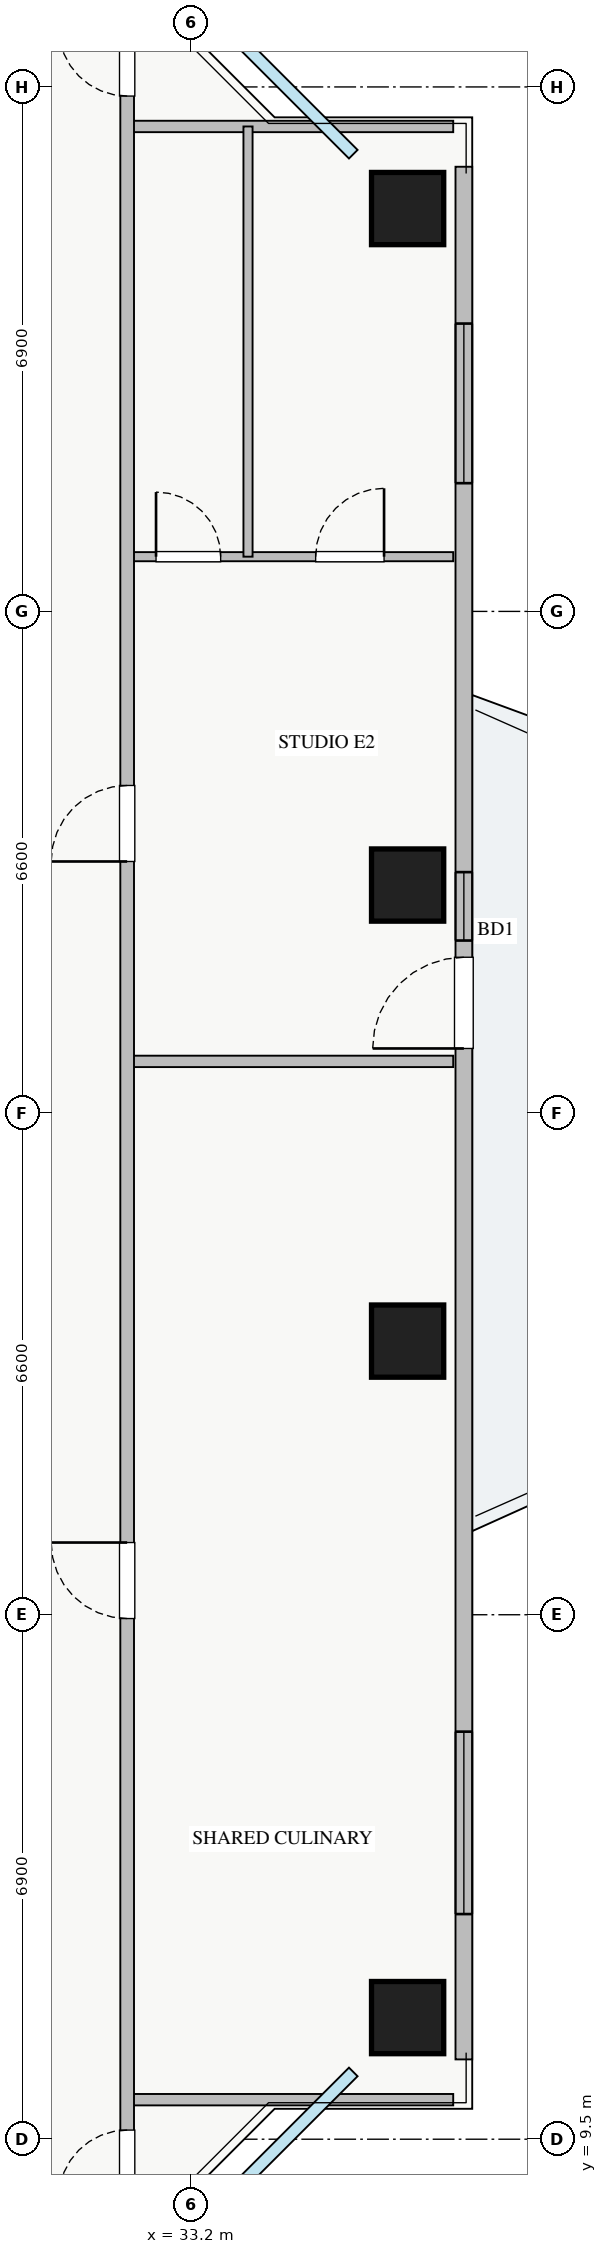
"""IFC4 building model, lengths in metres.
Left out: names, types, materials, properties, quantities, classifications, styles, units other than length and angle.
Written with IfcOpenShell. Run it as: python <this file> out.ifc"""

import sys

from ifc_helpers import new_model, si_unit, direction, frame, frame_2d, origin, origin_2d, place, context, subcontext, project, spatial, rectangle, extrude, source, transform, mapped, element, fill, save


model = new_model("IFC4")
c1 = context("Model", 3, precision=1e-05, world=origin(), true_north=direction((0.0, 1.0)))
c2 = subcontext(c1, "Body", "Model", "MODEL_VIEW")
j1 = project(units=[si_unit("LENGTHUNIT", "METRE"), si_unit("PLANEANGLEUNIT", "RADIAN")], contexts=[c1])
p1 = place(None, origin())
s1 = spatial("IfcSite", under=j1, at=p1, CompositionType="ELEMENT")
p2 = place(p1, origin())
s2 = spatial("IfcBuilding", under=s1, at=p2, CompositionType="ELEMENT")
p3 = place(p2, frame((0.0, 0.0, 150.25)))
s3 = spatial("IfcBuildingStorey", under=s2, at=p3, CompositionType="ELEMENT", Elevation=150.25)
m1 = source(origin(), c2, "Body", "SweptSolid", [
    extrude(rectangle(XDim=0.95, YDim=0.95, at=origin_2d()), origin(), (0.0, 0.0, 1.0), 3.25),
])
for number, where, z_axis, x_axis in (
    (1, (36.05, 11.1, 0.0), (0.0, 0.0, 1.0), (1.0, 0.0, 0.0)),
    (2, (36.05, 20.0, 0.0), (0.0, 0.0, 1.0), (1.0, 0.0, 0.0)),
    (3, (36.05, 26.0, 0.0), (0.0, 0.0, 1.0), (1.0, 0.0, 0.0)),
    (4, (36.05, 34.9, 0.0), (0.0, 0.0, 1.0), (1.0, 0.0, 0.0)),
):
    element("IfcColumn", number, at=place(p3, frame(where, z_axis=z_axis, x_axis=x_axis)), inside=s3, PredefinedType="COLUMN", context=c2, shape_type="MappedRepresentation", body=[
        mapped(m1, transform((0.0, 0.0, 0.0), x_axis=(1.0, 0.0, 0.0), y_axis=(0.0, 1.0, 0.0), z_axis=(0.0, 0.0, 1.0), scale=1.0)),
    ])
p4 = place(p3, frame((36.79, 10.55, 0.0), z_axis=(0.0, 0.0, 1.0), x_axis=(0.0, 1.0, 0.0)))
e5 = element("IfcWall", 5, at=p4, inside=s3, PredefinedType="STANDARD", context=c2, shape_type="SweptSolid", body=[
    extrude(rectangle(XDim=24.9, YDim=0.22, at=frame_2d((12.45, 0.0))), origin(), (0.0, 0.0, 1.0), 2.61),
])
p5 = place(p4, frame((13.3, 0.0, 0.0)))
e6 = element("IfcOpeningElement", 6, at=p5, cuts=e5, PredefinedType="OPENING", context=c2, shape_type="SweptSolid", body=[
    extrude(rectangle(XDim=1.2, YDim=2.1, at=frame_2d((0.6, 1.05))), frame((0.0, 0.12, 0.0), z_axis=(0.0, -1.0, 0.0), x_axis=(1.0, 0.0, 0.0)), (0.0, 0.0, 1.0), 0.24),
])
p6 = place(p4, frame((1.912, 0.0, 0.9)))
e7 = element("IfcOpeningElement", 7, at=p6, cuts=e5, PredefinedType="OPENING", context=c2, shape_type="SweptSolid", body=[
    extrude(rectangle(XDim=2.4, YDim=1.48, at=frame_2d((1.2, 0.74))), frame((0.0, 0.12, 0.0), z_axis=(0.0, -1.0, 0.0), x_axis=(1.0, 0.0, 0.0)), (0.0, 0.0, 1.0), 0.24),
])
p7 = place(p4, frame((20.737, 0.0, 0.9)))
e8 = element("IfcOpeningElement", 8, at=p7, cuts=e5, PredefinedType="OPENING", context=c2, shape_type="SweptSolid", body=[
    extrude(rectangle(XDim=2.1, YDim=1.48, at=frame_2d((1.05, 0.74))), frame((0.0, 0.12, 0.0), z_axis=(0.0, -1.0, 0.0), x_axis=(1.0, 0.0, 0.0)), (0.0, 0.0, 1.0), 0.24),
])
p8 = place(p4, frame((14.72, 0.0, 0.9)))
e9 = element("IfcOpeningElement", 9, at=p8, cuts=e5, PredefinedType="OPENING", context=c2, shape_type="SweptSolid", body=[
    extrude(rectangle(XDim=0.9, YDim=1.2, at=frame_2d((0.45, 0.6))), frame((0.0, 0.12, 0.0), z_axis=(0.0, -1.0, 0.0), x_axis=(1.0, 0.0, 0.0)), (0.0, 0.0, 1.0), 0.24),
])
for number, where, z_axis, x_axis in (
    (10, (32.36, 35.98, 0.0), (0.0, 0.0, 1.0), (1.0, 0.0, 0.0)),
    (11, (32.36, 10.02, 0.0), (0.0, 0.0, 1.0), (1.0, 0.0, 0.0)),
):
    element("IfcWall", number, at=place(p3, frame(where, z_axis=z_axis, x_axis=x_axis)), inside=s3, PredefinedType="PARTITIONING", context=c2, shape_type="SweptSolid", body=[
        extrude(rectangle(XDim=4.29, YDim=0.15, at=frame_2d((2.145, 0.0))), origin(), (0.0, 0.0, 1.0), 3.07),
    ])
p9 = place(p3, frame((32.36, 30.32, 0.0), z_axis=(0.0, 0.0, 1.0), x_axis=(1.0, 0.0, 0.0)))
e12 = element("IfcWall", 12, at=p9, inside=s3, PredefinedType="PLUMBINGWALL", context=c2, shape_type="SweptSolid", body=[
    extrude(rectangle(XDim=4.29, YDim=0.12, at=frame_2d((2.145, 0.0))), origin(), (0.0, 0.0, 1.0), 3.07),
])
p10 = place(p9, frame((0.38, 0.0, 0.0)))
e13 = element("IfcOpeningElement", 13, at=p10, cuts=e12, PredefinedType="OPENING", context=c2, shape_type="SweptSolid", body=[
    extrude(rectangle(XDim=0.85, YDim=2.05, at=frame_2d((0.425, 1.025))), frame((0.0, 0.07, 0.0), z_axis=(0.0, -1.0, 0.0), x_axis=(1.0, 0.0, 0.0)), (0.0, 0.0, 1.0), 0.14),
])
p11 = place(p9, frame((2.48, 0.0, 0.0)))
e14 = element("IfcOpeningElement", 14, at=p11, cuts=e12, PredefinedType="OPENING", context=c2, shape_type="SweptSolid", body=[
    extrude(rectangle(XDim=0.9, YDim=2.05, at=frame_2d((0.45, 1.025))), frame((0.0, 0.07, 0.0), z_axis=(0.0, -1.0, 0.0), x_axis=(1.0, 0.0, 0.0)), (0.0, 0.0, 1.0), 0.14),
])
p12 = place(p3, frame((33.95, 30.32, 0.0), z_axis=(0.0, 0.0, 1.0), x_axis=(0.0, 1.0, 0.0)))
e15 = element("IfcWall", 15, at=p12, inside=s3, PredefinedType="PLUMBINGWALL", context=c2, shape_type="SweptSolid", body=[
    extrude(rectangle(XDim=5.66, YDim=0.12, at=frame_2d((2.83, 0.0))), origin(), (0.0, 0.0, 1.0), 3.07),
])
p13 = place(p3, frame((32.36, 23.68, 0.0), z_axis=(0.0, 0.0, 1.0), x_axis=(1.0, 0.0, 0.0)))
e16 = element("IfcWall", 16, at=p13, inside=s3, PredefinedType="PARTITIONING", context=c2, shape_type="SweptSolid", body=[
    extrude(rectangle(XDim=4.29, YDim=0.15, at=frame_2d((2.145, 0.0))), origin(), (0.0, 0.0, 1.0), 3.07),
])
p14 = place(p3, frame((32.36, 8.3, 0.0), z_axis=(0.0, 0.0, 1.0), x_axis=(0.0, 1.0, 0.0)))
e17 = element("IfcWall", 17, at=p14, inside=s3, PredefinedType="PARTITIONING", context=c2, shape_type="SweptSolid", body=[
    extrude(rectangle(XDim=29.4, YDim=0.18, at=frame_2d((14.7, 0.0))), origin(), (0.0, 0.0, 1.0), 3.07),
])
p15 = place(p14, frame((28.08, 0.0, 0.0)))
e18 = element("IfcOpeningElement", 18, at=p15, cuts=e17, PredefinedType="OPENING", context=c2, shape_type="SweptSolid", body=[
    extrude(rectangle(XDim=0.9, YDim=2.05, at=frame_2d((0.45, 1.025))), frame((0.0, 0.1, 0.0), z_axis=(0.0, -1.0, 0.0), x_axis=(1.0, 0.0, 0.0)), (0.0, 0.0, 1.0), 0.2),
])
p16 = place(p14, frame((0.42, 0.0, 0.0)))
e19 = element("IfcOpeningElement", 19, at=p16, cuts=e17, PredefinedType="OPENING", context=c2, shape_type="SweptSolid", body=[
    extrude(rectangle(XDim=0.9, YDim=2.05, at=frame_2d((0.45, 1.025))), frame((0.0, 0.1, 0.0), z_axis=(0.0, -1.0, 0.0), x_axis=(1.0, 0.0, 0.0)), (0.0, 0.0, 1.0), 0.2),
])
p17 = place(p14, frame((8.05, 0.0, 0.0)))
e20 = element("IfcOpeningElement", 20, at=p17, cuts=e17, PredefinedType="OPENING", context=c2, shape_type="SweptSolid", body=[
    extrude(rectangle(XDim=1.0, YDim=2.05, at=frame_2d((0.5, 1.025))), frame((0.0, 0.1, 0.0), z_axis=(0.0, -1.0, 0.0), x_axis=(1.0, 0.0, 0.0)), (0.0, 0.0, 1.0), 0.2),
])
p18 = place(p14, frame((18.01, 0.0, 0.0)))
e21 = element("IfcOpeningElement", 21, at=p18, cuts=e17, PredefinedType="OPENING", context=c2, shape_type="SweptSolid", body=[
    extrude(rectangle(XDim=1.0, YDim=2.05, at=frame_2d((0.5, 1.025))), frame((0.0, 0.1, 0.0), z_axis=(0.0, -1.0, 0.0), x_axis=(1.0, 0.0, 0.0)), (0.0, 0.0, 1.0), 0.2),
])
m2 = source(origin(), c2, "Body", "SweptSolid", [
    extrude(rectangle(XDim=1.2, YDim=2.1, at=frame_2d((0.6, 1.05))), frame((0.0, 0.025, 0.0), z_axis=(0.0, -1.0, 0.0), x_axis=(1.0, 0.0, 0.0)), (0.0, 0.0, 1.0), 0.05),
])
p19 = place(p5, origin())
e22 = element("IfcDoor", 22, at=p19, inside=s3, OperationType="SINGLE_SWING_LEFT", PredefinedType="DOOR", context=c2, shape_type="MappedRepresentation", body=[
    mapped(m2, transform((0.0, 0.0, 0.0), x_axis=(1.0, 0.0, 0.0), y_axis=(0.0, 1.0, 0.0), z_axis=(0.0, 0.0, 1.0), scale=1.0)),
])
fill(e6, e22)
m3 = source(origin(), c2, "Body", "SweptSolid", [
    extrude(rectangle(XDim=2.4, YDim=1.48, at=frame_2d((1.2, 0.74))), frame((0.0, 0.03, 0.0), z_axis=(0.0, -1.0, 0.0), x_axis=(1.0, 0.0, 0.0)), (0.0, 0.0, 1.0), 0.06),
])
p20 = place(p6, origin())
e23 = element("IfcWindow", 23, at=p20, inside=s3, PartitioningType="TRIPLE_PANEL_VERTICAL", PredefinedType="WINDOW", context=c2, shape_type="MappedRepresentation", body=[
    mapped(m3, transform((0.0, 0.0, 0.0), x_axis=(1.0, 0.0, 0.0), y_axis=(0.0, 1.0, 0.0), z_axis=(0.0, 0.0, 1.0), scale=1.0)),
])
fill(e7, e23)
m4 = source(origin(), c2, "Body", "SweptSolid", [
    extrude(rectangle(XDim=2.1, YDim=1.48, at=frame_2d((1.05, 0.74))), frame((0.0, 0.03, 0.0), z_axis=(0.0, -1.0, 0.0), x_axis=(1.0, 0.0, 0.0)), (0.0, 0.0, 1.0), 0.06),
])
p21 = place(p7, origin())
e24 = element("IfcWindow", 24, at=p21, inside=s3, PartitioningType="TRIPLE_PANEL_VERTICAL", PredefinedType="WINDOW", context=c2, shape_type="MappedRepresentation", body=[
    mapped(m4, transform((0.0, 0.0, 0.0), x_axis=(1.0, 0.0, 0.0), y_axis=(0.0, 1.0, 0.0), z_axis=(0.0, 0.0, 1.0), scale=1.0)),
])
fill(e8, e24)
m5 = source(origin(), c2, "Body", "SweptSolid", [
    extrude(rectangle(XDim=0.85, YDim=2.05, at=frame_2d((0.425, 1.025))), frame((0.0, 0.025, 0.0), z_axis=(0.0, -1.0, 0.0), x_axis=(1.0, 0.0, 0.0)), (0.0, 0.0, 1.0), 0.05),
])
p22 = place(p10, origin())
e25 = element("IfcDoor", 25, at=p22, inside=s3, OperationType="SINGLE_SWING_LEFT", PredefinedType="DOOR", context=c2, shape_type="MappedRepresentation", body=[
    mapped(m5, transform((0.0, 0.0, 0.0), x_axis=(1.0, 0.0, 0.0), y_axis=(0.0, 1.0, 0.0), z_axis=(0.0, 0.0, 1.0), scale=1.0)),
])
fill(e13, e25)
m6 = source(origin(), c2, "Body", "SweptSolid", [
    extrude(rectangle(XDim=0.9, YDim=2.05, at=frame_2d((0.45, 1.025))), frame((0.0, 0.025, 0.0), z_axis=(0.0, -1.0, 0.0), x_axis=(1.0, 0.0, 0.0)), (0.0, 0.0, 1.0), 0.05),
])
p23 = place(p11, origin())
e26 = element("IfcDoor", 26, at=p23, inside=s3, OperationType="SINGLE_SWING_RIGHT", PredefinedType="DOOR", context=c2, shape_type="MappedRepresentation", body=[
    mapped(m6, transform((0.0, 0.0, 0.0), x_axis=(1.0, 0.0, 0.0), y_axis=(0.0, 1.0, 0.0), z_axis=(0.0, 0.0, 1.0), scale=1.0)),
])
fill(e14, e26)
p24 = place(p15, origin())
e27 = element("IfcDoor", 27, at=p24, inside=s3, OperationType="SINGLE_SWING_RIGHT", PredefinedType="DOOR", context=c2, shape_type="MappedRepresentation", body=[
    mapped(m6, transform((0.0, 0.0, 0.0), x_axis=(1.0, 0.0, 0.0), y_axis=(0.0, 1.0, 0.0), z_axis=(0.0, 0.0, 1.0), scale=1.0)),
])
fill(e18, e27)
p25 = place(p16, origin())
e28 = element("IfcDoor", 28, at=p25, inside=s3, OperationType="SINGLE_SWING_LEFT", PredefinedType="DOOR", context=c2, shape_type="MappedRepresentation", body=[
    mapped(m6, transform((0.0, 0.0, 0.0), x_axis=(1.0, 0.0, 0.0), y_axis=(0.0, 1.0, 0.0), z_axis=(0.0, 0.0, 1.0), scale=1.0)),
])
fill(e19, e28)
m7 = source(origin(), c2, "Body", "SweptSolid", [
    extrude(rectangle(XDim=1.0, YDim=2.05, at=frame_2d((0.5, 1.025))), frame((0.0, 0.025, 0.0), z_axis=(0.0, -1.0, 0.0), x_axis=(1.0, 0.0, 0.0)), (0.0, 0.0, 1.0), 0.05),
])
p26 = place(p17, origin())
e29 = element("IfcDoor", 29, at=p26, inside=s3, OperationType="SINGLE_SWING_RIGHT", PredefinedType="DOOR", context=c2, shape_type="MappedRepresentation", body=[
    mapped(m7, transform((0.0, 0.0, 0.0), x_axis=(1.0, 0.0, 0.0), y_axis=(0.0, 1.0, 0.0), z_axis=(0.0, 0.0, 1.0), scale=1.0)),
])
fill(e20, e29)
p27 = place(p18, origin())
e30 = element("IfcDoor", 30, at=p27, inside=s3, OperationType="SINGLE_SWING_LEFT", PredefinedType="DOOR", context=c2, shape_type="MappedRepresentation", body=[
    mapped(m7, transform((0.0, 0.0, 0.0), x_axis=(1.0, 0.0, 0.0), y_axis=(0.0, 1.0, 0.0), z_axis=(0.0, 0.0, 1.0), scale=1.0)),
])
fill(e21, e30)
m8 = source(origin(), c2, "Body", "SweptSolid", [
    extrude(rectangle(XDim=0.9, YDim=1.2, at=frame_2d((0.45, 0.6))), frame((0.0, 0.03, 0.0), z_axis=(0.0, -1.0, 0.0), x_axis=(1.0, 0.0, 0.0)), (0.0, 0.0, 1.0), 0.06),
])
p28 = place(p8, origin())
e31 = element("IfcWindow", 31, at=p28, inside=s3, PartitioningType="SINGLE_PANEL", PredefinedType="WINDOW", context=c2, shape_type="MappedRepresentation", body=[
    mapped(m8, transform((0.0, 0.0, 0.0), x_axis=(1.0, 0.0, 0.0), y_axis=(0.0, 1.0, 0.0), z_axis=(0.0, 0.0, 1.0), scale=1.0)),
])
fill(e9, e31)
save(model, sys.argv[1])
